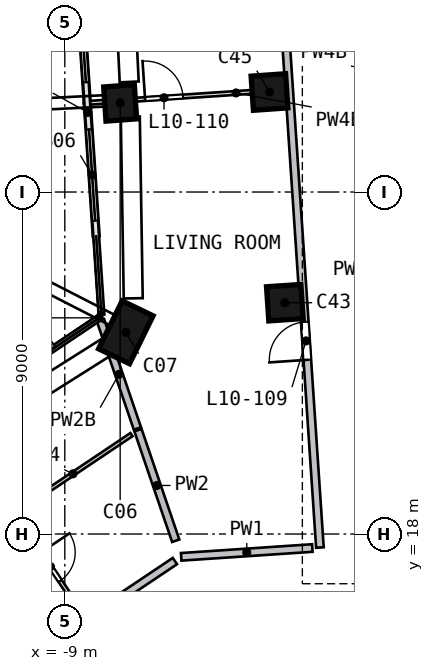
"""IFC4 building model, lengths in metres.
Left out: names, types, materials, properties, quantities, classifications, styles, units other than length and angle.
Written with IfcOpenShell. Run it as: python <this file> out.ifc"""

import sys

from ifc_helpers import new_model, si_unit, direction, frame, frame_2d, origin, origin_2d, place, context, subcontext, project, spatial, rectangle, extrude, element, fill, save


model = new_model("IFC4")
c1 = context("Model", 3, precision=1e-05, world=origin(), true_north=direction((0.0, 1.0)))
c2 = subcontext(c1, "Body", "Model", "MODEL_VIEW")
j1 = project(units=[si_unit("LENGTHUNIT", "METRE"), si_unit("PLANEANGLEUNIT", "RADIAN")], contexts=[c1])
p1 = place(None, origin())
s1 = spatial("IfcSite", under=j1, at=p1, CompositionType="ELEMENT")
p2 = place(p1, origin())
s2 = spatial("IfcBuilding", under=s1, at=p2, CompositionType="ELEMENT")
p3 = place(p2, frame((0.0, 0.0, 49.5)))
s3 = spatial("IfcBuildingStorey", under=s2, at=p3, CompositionType="ELEMENT", Elevation=49.5)
p4 = place(p3, frame((-7.376, 29.414, 0.0), z_axis=(-0.137221025, -0.056462705, 0.988929903), x_axis=(0.073632546, -0.996193284, -0.046660369)))
e1 = element("IfcColumn", 1, at=p4, inside=s3, PredefinedType="COLUMN", context=c2, shape_type="SweptSolid", body=[
    extrude(rectangle(XDim=0.9, YDim=0.8, at=origin_2d()), origin(), (0.0, 0.0, 1.0), 3.226),
])
p5 = place(p3, frame((-7.26, 23.351, 0.0), z_axis=(-0.110754339, -0.035423145, 0.99321633), x_axis=(0.433595077, 0.897517403, 0.080360565)))
e2 = element("IfcColumn", 2, at=p5, inside=s3, PredefinedType="COLUMN", context=c2, shape_type="SweptSolid", body=[
    extrude(rectangle(XDim=1.4, YDim=0.9, at=origin_2d()), origin(), (0.0, 0.0, 1.0), 3.212),
])
p6 = place(p3, frame((-3.071, 24.107, 0.0), z_axis=(-0.114564155, -0.015508353, 0.993294793), x_axis=(-0.067324919, 0.99770052, 0.007812051)))
e3 = element("IfcColumn", 3, at=p6, inside=s3, PredefinedType="COLUMN", context=c2, shape_type="SweptSolid", body=[
    extrude(rectangle(XDim=0.9, YDim=0.9, at=origin_2d()), origin(), (0.0, 0.0, 1.0), 3.211),
])
p7 = place(p3, frame((-3.445, 29.677, 0.0), z_axis=(-0.13875341, -0.03786938, 0.989602648), x_axis=(-0.070866168, 0.997086578, 0.028219537)))
e4 = element("IfcColumn", 4, at=p7, inside=s3, PredefinedType="COLUMN", context=c2, shape_type="SweptSolid", body=[
    extrude(rectangle(XDim=0.9, YDim=0.9, at=origin_2d()), origin(), (0.0, 0.0, 1.0), 3.223),
])
p8 = place(p3, frame((-8.634, 32.687, 0.0), z_axis=(0.0, 0.0, 1.0), x_axis=(0.066973677, -0.997754743, 0.0)))
e5 = element("IfcWall", 5, at=p8, inside=s3, PredefinedType="SOLIDWALL", context=c2, shape_type="SweptSolid", body=[
    extrude(rectangle(XDim=3.35, YDim=0.15, at=frame_2d((1.675, 0.0))), origin(), (0.0, 0.0, 1.0), 2.425),
])
p9 = place(p8, frame((0.4, 0.0, 0.0)))
e6 = element("IfcOpeningElement", 6, at=p9, cuts=e5, PredefinedType="OPENING", context=c2, shape_type="SweptSolid", body=[
    extrude(rectangle(XDim=2.4, YDim=2.4, at=frame_2d((1.2, 1.2))), frame((0.0, 0.085, 0.0), z_axis=(0.0, -1.0, 0.0), x_axis=(1.0, 0.0, 0.0)), (0.0, 0.0, 1.0), 0.17),
])
p10 = place(p3, frame((-8.409, 29.344, 0.0), z_axis=(0.0, 0.0, 1.0), x_axis=(0.066995591, -0.997753272, 0.0)))
e7 = element("IfcWall", 7, at=p10, inside=s3, PredefinedType="SOLIDWALL", context=c2, shape_type="SweptSolid", body=[
    extrude(rectangle(XDim=3.502, YDim=0.15, at=frame_2d((1.751, 0.0))), origin(), (0.0, 0.0, 1.0), 2.425),
])
p11 = place(p10, frame((0.702, 0.0, 0.0)))
e8 = element("IfcOpeningElement", 8, at=p11, cuts=e7, PredefinedType="OPENING", context=c2, shape_type="SweptSolid", body=[
    extrude(rectangle(XDim=2.4, YDim=2.4, at=frame_2d((1.2, 1.2))), frame((0.0, 0.085, 0.0), z_axis=(0.0, -1.0, 0.0), x_axis=(1.0, 0.0, 0.0)), (0.0, 0.0, 1.0), 0.17),
])
p12 = place(p3, frame((-13.841, 12.101, 0.0), z_axis=(0.0, 0.0, 1.0), x_axis=(0.830608164, 0.556857323, 0.0)))
e9 = element("IfcWall", 9, at=p12, inside=s3, PredefinedType="SOLIDWALL", context=c2, shape_type="SweptSolid", body=[
    extrude(rectangle(XDim=9.316, YDim=0.2, at=frame_2d((4.658, 0.0))), origin(), (0.0, 0.0, 1.0), 3.19),
])
p13 = place(p12, frame((5.15, 0.0, 0.0)))
e10 = element("IfcOpeningElement", 10, at=p13, cuts=e9, PredefinedType="OPENING", context=c2, shape_type="SweptSolid", body=[
    extrude(rectangle(XDim=1.0, YDim=2.1, at=frame_2d((0.5, 1.05))), frame((0.0, 0.11, 0.0), z_axis=(0.0, -1.0, 0.0), x_axis=(1.0, 0.0, 0.0)), (0.0, 0.0, 1.0), 0.22),
])
p14 = place(p3, frame((-2.486, 17.631, 0.0), z_axis=(0.0, 0.0, 1.0), x_axis=(-0.997758214, -0.066921946, 0.0)))
e11 = element("IfcWall", 11, at=p14, inside=s3, PredefinedType="SOLIDWALL", context=c2, shape_type="SweptSolid", body=[
    extrude(rectangle(XDim=3.458, YDim=0.2, at=frame_2d((1.729, 0.0))), origin(), (0.0, 0.0, 1.0), 3.19),
])
p15 = place(p3, frame((-2.287, 17.645, 0.0), z_axis=(0.0, 0.0, 1.0), x_axis=(-0.066974116, 0.997754713, 0.0)))
e12 = element("IfcWall", 12, at=p15, inside=s3, PredefinedType="SOLIDWALL", context=c2, shape_type="SweptSolid", body=[
    extrude(rectangle(XDim=23.25, YDim=0.2, at=frame_2d((11.625, 0.0))), origin(), (0.0, 0.0, 1.0), 3.19),
])
p16 = place(p15, frame((4.95, 0.0, 0.0)))
e13 = element("IfcOpeningElement", 13, at=p16, cuts=e12, PredefinedType="OPENING", context=c2, shape_type="SweptSolid", body=[
    extrude(rectangle(XDim=1.0, YDim=2.1, at=frame_2d((0.5, 1.05))), frame((0.0, 0.11, 0.0), z_axis=(0.0, -1.0, 0.0), x_axis=(1.0, 0.0, 0.0)), (0.0, 0.0, 1.0), 0.22),
])
p17 = place(p3, frame((-1.649, 40.99, 0.0), z_axis=(0.0, 0.0, 1.0), x_axis=(0.066973147, -0.997754778, 0.0)))
e14 = element("IfcWall", 14, at=p17, inside=s3, PredefinedType="SOLIDWALL", context=c2, shape_type="SweptSolid", body=[
    extrude(rectangle(XDim=23.05, YDim=0.2, at=frame_2d((11.525, 0.0))), origin(), (0.0, 0.0, 1.0), 3.19),
])
p18 = place(p17, frame((7.883, 0.0, 0.0)))
e15 = element("IfcOpeningElement", 15, at=p18, cuts=e14, PredefinedType="OPENING", context=c2, shape_type="SweptSolid", body=[
    extrude(rectangle(XDim=1.0, YDim=2.1, at=frame_2d((0.5, 1.05))), frame((0.0, 0.11, 0.0), z_axis=(0.0, -1.0, 0.0), x_axis=(1.0, 0.0, 0.0)), (0.0, 0.0, 1.0), 0.22),
])
p19 = place(p3, frame((-7.089, 20.777, 0.0), z_axis=(0.0, 0.0, 1.0), x_axis=(-0.322908317, 0.946430251, 0.0)))
e16 = element("IfcWall", 16, at=p19, inside=s3, PredefinedType="SOLIDWALL", context=c2, shape_type="SweptSolid", body=[
    extrude(rectangle(XDim=3.011, YDim=0.2, at=frame_2d((1.506, 0.0))), origin(), (0.0, 0.0, 1.0), 2.69),
])
p20 = place(p3, frame((-6.081, 17.823, 0.0), z_axis=(0.0, 0.0, 1.0), x_axis=(-0.322937445, 0.946420312, 0.0)))
e17 = element("IfcWall", 17, at=p20, inside=s3, PredefinedType="SOLIDWALL", context=c2, shape_type="SweptSolid", body=[
    extrude(rectangle(XDim=3.075, YDim=0.2, at=frame_2d((1.537, 0.0))), origin(), (0.0, 0.0, 1.0), 3.19),
])
p21 = place(p3, frame((-10.266, 18.47, 0.0), z_axis=(0.0, 0.0, 1.0), x_axis=(0.556860995, -0.830605702, 0.0)))
e18 = element("IfcWall", 18, at=p21, inside=s3, PredefinedType="PARTITIONING", context=c2, shape_type="SweptSolid", body=[
    extrude(rectangle(XDim=3.1, YDim=0.1, at=frame_2d((1.55, 0.0))), origin(), (0.0, 0.0, 1.0), 3.19),
])
p22 = place(p21, frame((1.15, 0.0, 0.0)))
e19 = element("IfcOpeningElement", 19, at=p22, cuts=e18, PredefinedType="OPENING", context=c2, shape_type="SweptSolid", body=[
    extrude(rectangle(XDim=0.9, YDim=2.1, at=frame_2d((0.45, 1.05))), frame((0.0, 0.06, 0.0), z_axis=(0.0, -1.0, 0.0), x_axis=(1.0, 0.0, 0.0)), (0.0, 0.0, 1.0), 0.12),
])
p23 = place(p3, frame((-10.322, 18.553, 0.0), z_axis=(0.0, 0.0, 1.0), x_axis=(0.83060748, 0.556858344, 0.0)))
e20 = element("IfcWall", 20, at=p23, inside=s3, PredefinedType="PARTITIONING", context=c2, shape_type="SweptSolid", body=[
    extrude(rectangle(XDim=3.704, YDim=0.1, at=frame_2d((1.852, 0.0))), origin(), (0.0, 0.0, 1.0), 3.19),
])
p24 = place(p3, frame((-8.334, 29.349, 0.0), z_axis=(0.0, 0.0, 1.0), x_axis=(0.997755754, 0.066958606, 0.0)))
e21 = element("IfcWall", 21, at=p24, inside=s3, PredefinedType="PARTITIONING", context=c2, shape_type="SweptSolid", body=[
    extrude(rectangle(XDim=5.05, YDim=0.1, at=frame_2d((2.525, 0.0))), origin(), (0.0, 0.0, 1.0), 2.69),
])
p25 = place(p24, frame((1.45, 0.0, 0.0)))
e22 = element("IfcOpeningElement", 22, at=p25, cuts=e21, PredefinedType="OPENING", context=c2, shape_type="SweptSolid", body=[
    extrude(rectangle(XDim=1.0, YDim=2.1, at=frame_2d((0.5, 1.05))), frame((0.0, 0.06, 0.0), z_axis=(0.0, -1.0, 0.0), x_axis=(1.0, 0.0, 0.0)), (0.0, 0.0, 1.0), 0.12),
])
p26 = place(p9, origin())
e23 = element("IfcDoor", 23, at=p26, inside=s3, OperationType="SLIDING_TO_RIGHT", PredefinedType="DOOR", context=c2, shape_type="SweptSolid", body=[
    extrude(rectangle(XDim=2.4, YDim=2.4, at=frame_2d((1.2, 1.2))), frame((0.0, 0.025, 0.0), z_axis=(0.0, -1.0, 0.0), x_axis=(1.0, 0.0, 0.0)), (0.0, 0.0, 1.0), 0.05),
])
fill(e6, e23)
p27 = place(p11, origin())
e24 = element("IfcDoor", 24, at=p27, inside=s3, OperationType="SLIDING_TO_LEFT", PredefinedType="DOOR", context=c2, shape_type="SweptSolid", body=[
    extrude(rectangle(XDim=2.4, YDim=2.4, at=frame_2d((1.2, 1.2))), frame((0.0, 0.025, 0.0), z_axis=(0.0, -1.0, 0.0), x_axis=(1.0, 0.0, 0.0)), (0.0, 0.0, 1.0), 0.05),
])
fill(e8, e24)
p28 = place(p16, origin())
e25 = element("IfcDoor", 25, at=p28, inside=s3, OperationType="SINGLE_SWING_LEFT", PredefinedType="DOOR", context=c2, shape_type="SweptSolid", body=[
    extrude(rectangle(XDim=1.0, YDim=2.1, at=frame_2d((0.5, 1.05))), frame((0.0, 0.025, 0.0), z_axis=(0.0, -1.0, 0.0), x_axis=(1.0, 0.0, 0.0)), (0.0, 0.0, 1.0), 0.05),
])
fill(e13, e25)
p29 = place(p25, origin())
e26 = element("IfcDoor", 26, at=p29, inside=s3, OperationType="SINGLE_SWING_LEFT", PredefinedType="DOOR", context=c2, shape_type="SweptSolid", body=[
    extrude(rectangle(XDim=1.0, YDim=2.1, at=frame_2d((0.5, 1.05))), frame((0.0, 0.025, 0.0), z_axis=(0.0, -1.0, 0.0), x_axis=(1.0, 0.0, 0.0)), (0.0, 0.0, 1.0), 0.05),
])
fill(e22, e26)
p30 = place(p22, origin())
e27 = element("IfcDoor", 27, at=p30, inside=s3, OperationType="SINGLE_SWING_LEFT", PredefinedType="DOOR", context=c2, shape_type="SweptSolid", body=[
    extrude(rectangle(XDim=0.9, YDim=2.1, at=frame_2d((0.45, 1.05))), frame((0.0, 0.025, 0.0), z_axis=(0.0, -1.0, 0.0), x_axis=(1.0, 0.0, 0.0)), (0.0, 0.0, 1.0), 0.05),
])
fill(e19, e27)
save(model, sys.argv[1])
